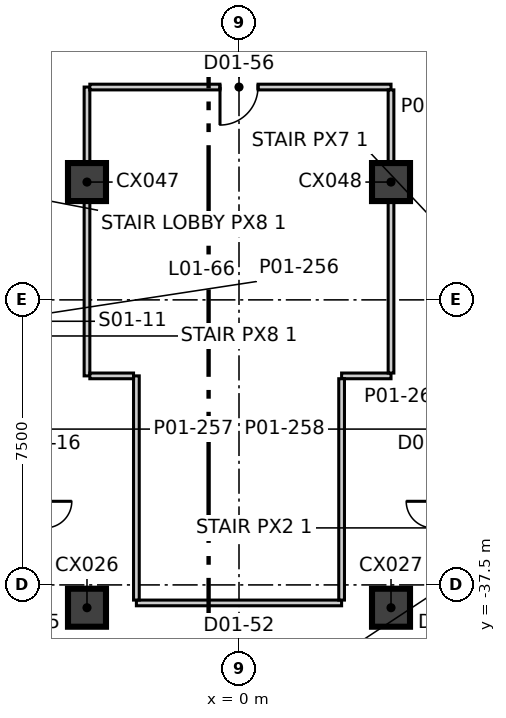
"""IFC4 building model, lengths in metres.
Left out: names, types, materials, properties, quantities, classifications, styles, units other than length and angle.
Written with IfcOpenShell. Run it as: python <this file> out.ifc"""

import sys

from ifc_helpers import new_model, si_unit, direction, frame, frame_2d, origin, origin_2d, place, context, subcontext, project, spatial, rectangle, extrude, element, fill, save


model = new_model("IFC4")
c1 = context("Model", 3, precision=1e-05, world=origin(), true_north=direction((0.0, 1.0)))
c2 = subcontext(c1, "Body", "Model", "MODEL_VIEW")
j1 = project(units=[si_unit("LENGTHUNIT", "METRE"), si_unit("PLANEANGLEUNIT", "RADIAN")], contexts=[c1])
p1 = place(None, origin())
s1 = spatial("IfcSite", under=j1, at=p1, CompositionType="ELEMENT")
p2 = place(p1, origin())
s2 = spatial("IfcBuilding", under=s1, at=p2, CompositionType="ELEMENT")
p3 = place(p2, frame((0.0, 0.0, 8.5)))
s3 = spatial("IfcBuildingStorey", under=s2, at=p3, CompositionType="ELEMENT", Elevation=8.5)
for number, where, z_axis, x_axis in (
    (1, (-4.0, -38.1, -0.4), (0.0, 0.0, 1.0), (1.0, 0.0, 0.0)),
    (2, (4.0, -38.1, -0.4), (0.0, 0.0, 1.0), (1.0, 0.0, 0.0)),
    (3, (-4.0, -26.9, -0.4), (0.0, 0.0, 1.0), (1.0, 0.0, 0.0)),
    (4, (4.0, -26.9, -0.4), (0.0, 0.0, 1.0), (1.0, 0.0, 0.0)),
):
    element("IfcColumn", number, at=place(p3, frame(where, z_axis=z_axis, x_axis=x_axis)), inside=s3, PredefinedType="COLUMN", context=c2, shape_type="SweptSolid", body=[
        extrude(rectangle(XDim=1.0, YDim=1.0, at=origin_2d()), origin(), (0.0, 0.0, 1.0), 6.0),
    ])
p4 = place(p3, frame((-4.0, -32.0, 0.0), z_axis=(0.0, 0.0, 1.0), x_axis=(0.0, 1.0, 0.0)))
e5 = element("IfcWall", 5, at=p4, inside=s3, PredefinedType="PARTITIONING", context=c2, shape_type="SweptSolid", body=[
    extrude(rectangle(XDim=7.6, YDim=0.15, at=frame_2d((3.8, 0.0))), origin(), (0.0, 0.0, 1.0), 5.6),
])
p5 = place(p3, frame((-2.7, -37.974, 0.0), z_axis=(0.0, 0.0, 1.0), x_axis=(1.0, 0.0, 0.0)))
e6 = element("IfcWall", 6, at=p5, inside=s3, PredefinedType="PARTITIONING", context=c2, shape_type="SweptSolid", body=[
    extrude(rectangle(XDim=5.4, YDim=0.15, at=frame_2d((2.7, 0.0))), origin(), (0.0, 0.0, 1.0), 5.6),
])
p6 = place(p3, frame((-2.7, -37.899, 0.0), z_axis=(0.0, 0.0, 1.0), x_axis=(0.0, 1.0, 0.0)))
e7 = element("IfcWall", 7, at=p6, inside=s3, PredefinedType="PARTITIONING", context=c2, shape_type="SweptSolid", body=[
    extrude(rectangle(XDim=5.899, YDim=0.15, at=frame_2d((2.949, 0.0))), origin(), (0.0, 0.0, 1.0), 5.6),
])
p7 = place(p3, frame((-3.925, -32.0, 0.0), z_axis=(0.0, 0.0, 1.0), x_axis=(1.0, 0.0, 0.0)))
e8 = element("IfcWall", 8, at=p7, inside=s3, PredefinedType="PARTITIONING", context=c2, shape_type="SweptSolid", body=[
    extrude(rectangle(XDim=1.15, YDim=0.15, at=frame_2d((0.575, 0.0))), origin(), (0.0, 0.0, 1.0), 5.6),
])
p8 = place(p3, frame((2.7, -32.0, 0.0), z_axis=(0.0, 0.0, 1.0), x_axis=(1.0, 0.0, 0.0)))
e9 = element("IfcWall", 9, at=p8, inside=s3, PredefinedType="PARTITIONING", context=c2, shape_type="SweptSolid", body=[
    extrude(rectangle(XDim=1.3, YDim=0.15, at=frame_2d((0.65, 0.0))), origin(), (0.0, 0.0, 1.0), 5.6),
])
p9 = place(p3, frame((-3.925, -24.4, 0.0), z_axis=(0.0, 0.0, 1.0), x_axis=(1.0, 0.0, 0.0)))
e10 = element("IfcWall", 10, at=p9, inside=s3, PredefinedType="PARTITIONING", context=c2, shape_type="SweptSolid", body=[
    extrude(rectangle(XDim=7.925, YDim=0.15, at=frame_2d((3.962, 0.0))), origin(), (0.0, 0.0, 1.0), 5.6),
])
p10 = place(p9, frame((3.425, 0.0, 0.0)))
e11 = element("IfcOpeningElement", 11, at=p10, cuts=e10, PredefinedType="OPENING", context=c2, shape_type="SweptSolid", body=[
    extrude(rectangle(XDim=1.0, YDim=2.1, at=frame_2d((0.5, 1.05))), frame((0.0, 0.085, 0.0), z_axis=(0.0, -1.0, 0.0), x_axis=(1.0, 0.0, 0.0)), (0.0, 0.0, 1.0), 0.17),
])
p11 = place(p3, frame((4.0, -31.925, 0.0), z_axis=(0.0, 0.0, 1.0), x_axis=(0.0, 1.0, 0.0)))
e12 = element("IfcWall", 12, at=p11, inside=s3, PredefinedType="PARTITIONING", context=c2, shape_type="SweptSolid", body=[
    extrude(rectangle(XDim=7.45, YDim=0.15, at=frame_2d((3.725, 0.0))), origin(), (0.0, 0.0, 1.0), 5.6),
])
p12 = place(p3, frame((2.7, -37.899, 0.0), z_axis=(0.0, 0.0, 1.0), x_axis=(0.0, 1.0, 0.0)))
e13 = element("IfcWall", 13, at=p12, inside=s3, PredefinedType="PARTITIONING", context=c2, shape_type="SweptSolid", body=[
    extrude(rectangle(XDim=5.824, YDim=0.15, at=frame_2d((2.912, 0.0))), origin(), (0.0, 0.0, 1.0), 5.6),
])
p13 = place(p10, origin())
e14 = element("IfcDoor", 14, at=p13, inside=s3, OperationType="SINGLE_SWING_LEFT", PredefinedType="DOOR", context=c2, shape_type="SweptSolid", body=[
    extrude(rectangle(XDim=1.0, YDim=2.1, at=frame_2d((0.5, 1.05))), frame((0.0, 0.025, 0.0), z_axis=(0.0, -1.0, 0.0), x_axis=(1.0, 0.0, 0.0)), (0.0, 0.0, 1.0), 0.05),
])
fill(e11, e14)
save(model, sys.argv[1])
